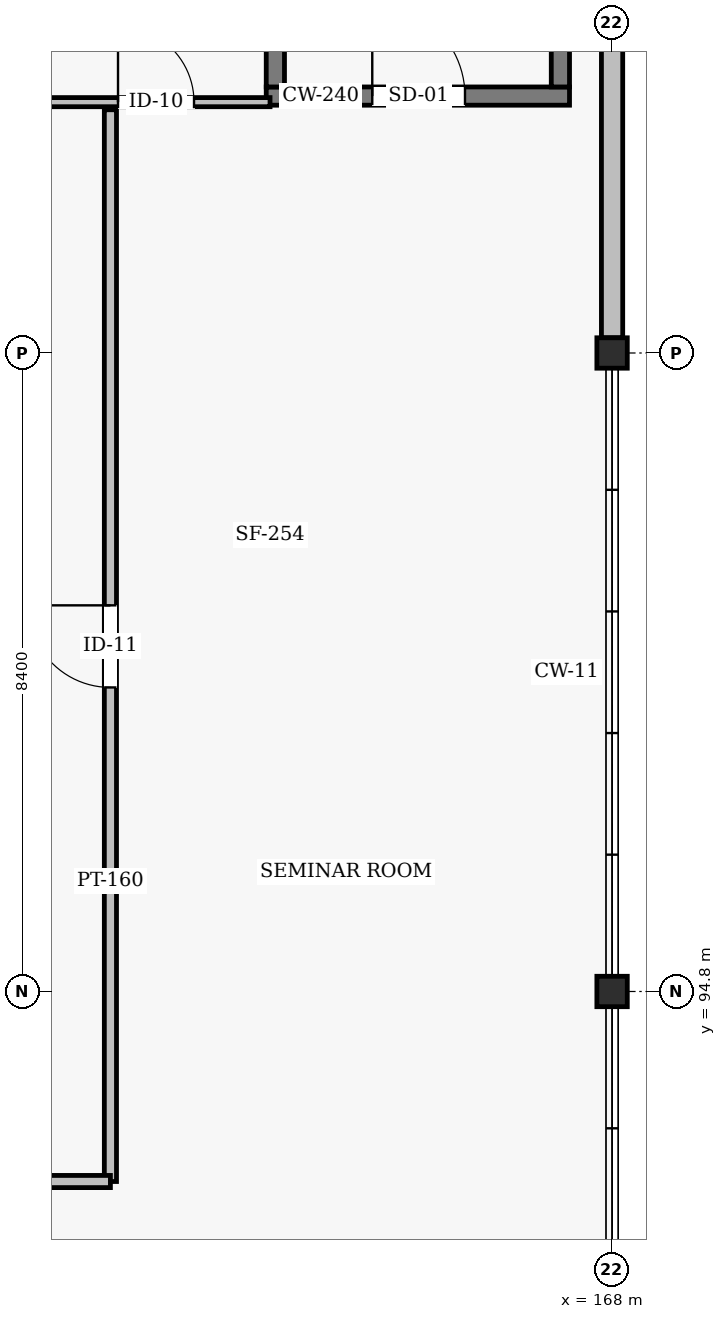
"""IFC4 building model, lengths in metres.
Left out: names, types, materials, properties, quantities, classifications, styles, units other than length and angle.
Written with IfcOpenShell. Run it as: python <this file> out.ifc"""

import sys

from ifc_helpers import new_model, si_unit, direction, frame, frame_2d, origin, origin_2d, place, context, subcontext, project, spatial, rectangle, hollow_rectangle, extrude, element, fill, save


model = new_model("IFC4")
c1 = context("Model", 3, precision=1e-05, world=origin(), true_north=direction((0.0, 1.0)))
c2 = subcontext(c1, "Body", "Model", "MODEL_VIEW")
j1 = project(units=[si_unit("LENGTHUNIT", "METRE"), si_unit("PLANEANGLEUNIT", "RADIAN")], contexts=[c1])
p1 = place(None, origin())
s1 = spatial("IfcSite", under=j1, at=p1, CompositionType="ELEMENT")
p2 = place(p1, origin())
s2 = spatial("IfcBuilding", under=s1, at=p2, CompositionType="ELEMENT")
p3 = place(p2, frame((0.0, 0.0, 54.0)))
s3 = spatial("IfcBuildingStorey", under=s2, at=p3, CompositionType="ELEMENT", Elevation=54.0)
for number, where, z_axis, x_axis in (
    (1, (168.0, 94.8, 0.0), (0.0, 0.0, 1.0), (1.0, 0.0, 0.0)),
    (2, (168.0, 103.2, 0.0), (0.0, 0.0, 1.0), (1.0, 0.0, 0.0)),
):
    element("IfcColumn", number, at=place(p3, frame(where, z_axis=z_axis, x_axis=x_axis)), inside=s3, PredefinedType="COLUMN", context=c2, shape_type="SweptSolid", body=[
        extrude(hollow_rectangle(XDim=0.4, YDim=0.4, WallThickness=0.016, InnerFilletRadius=0.016, OuterFilletRadius=0.032, at=origin_2d()), origin(), (0.0, 0.0, 1.0), 3.6),
    ])
p4 = place(p3, frame((168.0, 103.4, 0.0), z_axis=(0.0, 0.0, 1.0), x_axis=(0.0, 1.0, 0.0)))
e3 = element("IfcWall", 3, at=p4, inside=s3, PredefinedType="SOLIDWALL", context=c2, shape_type="SweptSolid", body=[
    extrude(rectangle(XDim=11.6, YDim=0.28, at=frame_2d((5.8, 0.0))), origin(), (0.0, 0.0, 1.0), 2.552),
])
p5 = place(p3, frame((163.45, 106.58, 0.0), z_axis=(0.0, 0.0, 1.0), x_axis=(1.0, 0.0, 0.0)))
e4 = element("IfcWall", 4, at=p5, inside=s3, PredefinedType="SHEAR", context=c2, shape_type="SweptSolid", body=[
    extrude(rectangle(XDim=3.99, YDim=0.24, at=frame_2d((1.995, 0.0))), origin(), (0.0, 0.0, 1.0), 3.344),
])
p6 = place(p5, frame((1.395, 0.0, 0.0)))
e5 = element("IfcOpeningElement", 5, at=p6, cuts=e4, PredefinedType="OPENING", context=c2, shape_type="SweptSolid", body=[
    extrude(rectangle(XDim=1.22, YDim=2.18, at=frame_2d((0.61, 1.09))), frame((0.0, 0.13, 0.0), z_axis=(0.0, -1.0, 0.0), x_axis=(1.0, 0.0, 0.0)), (0.0, 0.0, 1.0), 0.26),
])
for number, where, z_axis, x_axis in (
    (6, (163.57, 106.7, 0.0), (0.0, 0.0, 1.0), (0.0, 1.0, 0.0)),
    (7, (167.32, 106.7, 0.0), (0.0, 0.0, 1.0), (0.0, 1.0, 0.0)),
):
    element("IfcWall", number, at=place(p3, frame(where, z_axis=z_axis, x_axis=x_axis)), inside=s3, PredefinedType="SHEAR", context=c2, shape_type="SweptSolid", body=[
        extrude(rectangle(XDim=7.9, YDim=0.24, at=frame_2d((3.95, 0.0))), origin(), (0.0, 0.0, 1.0), 3.344),
    ])
p7 = place(p3, frame((160.5, 106.5, 0.0), z_axis=(0.0, 0.0, 1.0), x_axis=(1.0, 0.0, 0.0)))
e8 = element("IfcWall", 8, at=p7, inside=s3, PredefinedType="PARTITIONING", context=c2, shape_type="SweptSolid", body=[
    extrude(rectangle(XDim=3.0, YDim=0.12, at=frame_2d((1.5, 0.0))), origin(), (0.0, 0.0, 1.0), 3.344),
])
p8 = place(p7, frame((1.0, 0.0, 0.0)))
e9 = element("IfcOpeningElement", 9, at=p8, cuts=e8, PredefinedType="OPENING", context=c2, shape_type="SweptSolid", body=[
    extrude(rectangle(XDim=1.0, YDim=2.1, at=frame_2d((0.5, 1.05))), frame((0.0, 0.07, 0.0), z_axis=(0.0, -1.0, 0.0), x_axis=(1.0, 0.0, 0.0)), (0.0, 0.0, 1.0), 0.14),
])
p9 = place(p3, frame((161.4, 92.3, 0.0), z_axis=(0.0, 0.0, 1.0), x_axis=(0.0, 1.0, 0.0)))
e10 = element("IfcWall", 10, at=p9, inside=s3, PredefinedType="PARTITIONING", context=c2, shape_type="SweptSolid", body=[
    extrude(rectangle(XDim=14.1, YDim=0.16, at=frame_2d((7.05, 0.0))), origin(), (0.0, 0.0, 1.0), 2.748),
])
p10 = place(p9, frame((6.5, 0.0, 0.0)))
e11 = element("IfcOpeningElement", 11, at=p10, cuts=e10, PredefinedType="OPENING", context=c2, shape_type="SweptSolid", body=[
    extrude(rectangle(XDim=1.08, YDim=2.08, at=frame_2d((0.54, 1.04))), frame((0.0, 0.09, 0.0), z_axis=(0.0, -1.0, 0.0), x_axis=(1.0, 0.0, 0.0)), (0.0, 0.0, 1.0), 0.18),
])
p11 = place(p3, frame((150.0, 92.3, 0.0), z_axis=(0.0, 0.0, 1.0), x_axis=(1.0, 0.0, 0.0)))
e12 = element("IfcWall", 12, at=p11, inside=s3, PredefinedType="PARTITIONING", context=c2, shape_type="SweptSolid", body=[
    extrude(rectangle(XDim=11.4, YDim=0.16, at=frame_2d((5.7, 0.0))), origin(), (0.0, 0.0, 1.0), 2.844),
])
p12 = place(p11, frame((5.15, 0.0, 0.0)))
e13 = element("IfcOpeningElement", 13, at=p12, cuts=e12, PredefinedType="OPENING", context=c2, shape_type="SweptSolid", body=[
    extrude(rectangle(XDim=1.08, YDim=2.08, at=frame_2d((0.54, 1.04))), frame((0.0, 0.09, 0.0), z_axis=(0.0, -1.0, 0.0), x_axis=(1.0, 0.0, 0.0)), (0.0, 0.0, 1.0), 0.18),
])
p13 = place(p6, origin())
e14 = element("IfcDoor", 14, at=p13, inside=s3, OperationType="SINGLE_SWING_LEFT", PredefinedType="DOOR", context=c2, shape_type="SweptSolid", body=[
    extrude(rectangle(XDim=1.22, YDim=2.18, at=frame_2d((0.61, 1.09))), frame((0.0, 0.025, 0.0), z_axis=(0.0, -1.0, 0.0), x_axis=(1.0, 0.0, 0.0)), (0.0, 0.0, 1.0), 0.05),
])
fill(e5, e14)
p14 = place(p8, origin())
e15 = element("IfcDoor", 15, at=p14, inside=s3, OperationType="SINGLE_SWING_LEFT", PredefinedType="DOOR", context=c2, shape_type="SweptSolid", body=[
    extrude(rectangle(XDim=1.0, YDim=2.1, at=frame_2d((0.5, 1.05))), frame((0.0, 0.025, 0.0), z_axis=(0.0, -1.0, 0.0), x_axis=(1.0, 0.0, 0.0)), (0.0, 0.0, 1.0), 0.05),
])
fill(e9, e15)
p15 = place(p10, origin())
e16 = element("IfcDoor", 16, at=p15, inside=s3, OperationType="SINGLE_SWING_RIGHT", PredefinedType="DOOR", context=c2, shape_type="SweptSolid", body=[
    extrude(rectangle(XDim=1.08, YDim=2.08, at=frame_2d((0.54, 1.04))), frame((0.0, 0.025, 0.0), z_axis=(0.0, -1.0, 0.0), x_axis=(1.0, 0.0, 0.0)), (0.0, 0.0, 1.0), 0.05),
])
fill(e11, e16)
save(model, sys.argv[1])
